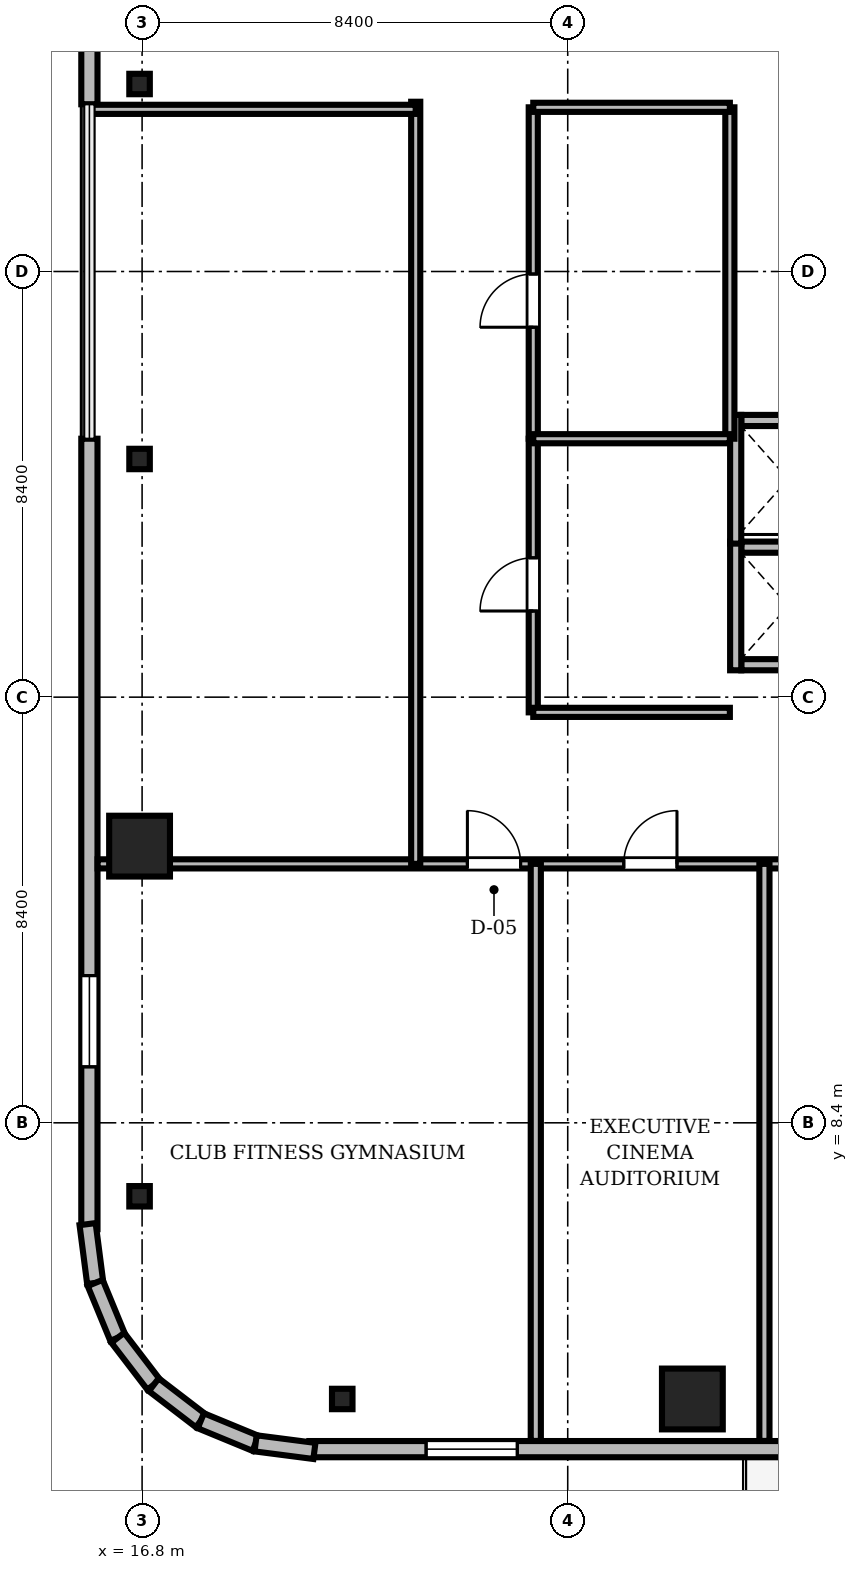
"""IFC4 building model, lengths in metres.
Left out: names, types, materials, properties, quantities, classifications, styles, units other than length and angle.
Written with IfcOpenShell. Run it as: python <this file> out.ifc"""

import sys

from ifc_helpers import new_model, si_unit, direction, frame, frame_2d, origin, origin_2d, place, context, subcontext, project, spatial, rectangle, i_section, extrude, source, transform, mapped, element, fill, save


model = new_model("IFC4")
c1 = context("Model", 3, precision=1e-05, world=origin(), true_north=direction((0.0, 1.0)))
c2 = subcontext(c1, "Body", "Model", "MODEL_VIEW")
j1 = project(units=[si_unit("LENGTHUNIT", "METRE"), si_unit("PLANEANGLEUNIT", "RADIAN")], contexts=[c1])
p1 = place(None, origin())
s1 = spatial("IfcSite", under=j1, at=p1, CompositionType="ELEMENT")
p2 = place(p1, origin())
s2 = spatial("IfcBuilding", under=s1, at=p2, CompositionType="ELEMENT")
p3 = place(p2, frame((0.0, 0.0, 250.6)))
s3 = spatial("IfcBuildingStorey", under=s2, at=p3, CompositionType="ELEMENT", Elevation=250.6)
m1 = source(origin(), c2, "Body", "SweptSolid", [
    extrude(rectangle(XDim=1.2, YDim=1.2, at=origin_2d()), origin(), (0.0, 0.0, 1.0), 3.65),
])
for number, where, z_axis, x_axis in (
    (1, (27.66, 2.95, 0.0), (0.0, 0.0, 1.0), (1.0, 0.0, 0.0)),
    (2, (16.75, 13.86, 0.0), (0.0, 0.0, 1.0), (1.0, 0.0, 0.0)),
):
    element("IfcColumn", number, at=place(p3, frame(where, z_axis=z_axis, x_axis=x_axis)), inside=s3, PredefinedType="COLUMN", context=c2, shape_type="MappedRepresentation", body=[
        mapped(m1, transform((0.0, 0.0, 0.0), scale=1.0)),
    ])
m2 = source(origin(), c2, "Body", "SweptSolid", [
    extrude(i_section(OverallWidth=0.405, OverallDepth=0.403, WebThickness=0.018, FlangeThickness=0.028, FilletRadius=0.015, at=origin_2d()), origin(), (0.0, 0.0, 1.0), 3.65),
])
for number, where, z_axis, x_axis in (
    (3, (20.75, 2.95, 0.0), (0.0, 0.0, 1.0), (1.0, 0.0, 0.0)),
    (4, (16.75, 28.9, 0.0), (0.0, 0.0, 1.0), (1.0, 0.0, 0.0)),
    (5, (16.75, 21.5, 0.0), (0.0, 0.0, 1.0), (1.0, 0.0, 0.0)),
    (6, (16.75, 6.95, 0.0), (0.0, 0.0, 1.0), (1.0, 0.0, 0.0)),
):
    element("IfcColumn", number, at=place(p3, frame(where, z_axis=z_axis, x_axis=x_axis)), inside=s3, PredefinedType="COLUMN", context=c2, shape_type="MappedRepresentation", body=[
        mapped(m2, transform((0.0, 0.0, 0.0), scale=1.0)),
    ])
m3 = source(origin(), c2, "Body", "SweptSolid", [
    extrude(rectangle(XDim=15.6, YDim=0.32, at=frame_2d((7.8, 0.0))), origin(), (0.0, 0.0, 1.0), 3.65),
])
p4 = place(p3, frame((20.1, 1.96, 0.0), z_axis=(0.0, 0.0, 1.0), x_axis=(1.0, 0.0, 0.0)))
e7 = element("IfcWall", 7, at=p4, inside=s3, PredefinedType="SOLIDWALL", context=c2, shape_type="MappedRepresentation", body=[
    mapped(m3, transform((0.0, 0.0, 0.0), scale=1.0)),
])
m4 = source(origin(), c2, "Body", "SweptSolid", [
    extrude(rectangle(XDim=1.4, YDim=2.3, at=frame_2d((0.7, 1.15))), frame((0.0, 0.17, 0.0), z_axis=(0.0, -1.0, 0.0), x_axis=(1.0, 0.0, 0.0)), (0.0, 0.0, 1.0), 0.34),
])
p5 = place(p4, frame((9.61, 0.0, 0.0)))
e8 = element("IfcOpeningElement", 8, at=p5, cuts=e7, PredefinedType="OPENING", context=c2, shape_type="MappedRepresentation", body=[
    mapped(m4, transform((0.0, 0.0, 0.0), scale=1.0)),
])
m5 = source(origin(), c2, "Body", "SweptSolid", [
    extrude(rectangle(XDim=1.8, YDim=2.4, at=frame_2d((0.9, 1.2))), frame((0.0, 0.17, 0.0), z_axis=(0.0, -1.0, 0.0), x_axis=(1.0, 0.0, 0.0)), (0.0, 0.0, 1.0), 0.34),
])
p6 = place(p4, frame((2.305, 0.0, 0.72)))
e9 = element("IfcOpeningElement", 9, at=p6, cuts=e7, PredefinedType="OPENING", context=c2, shape_type="MappedRepresentation", body=[
    mapped(m5, transform((0.0, 0.0, 0.0), scale=1.0)),
])
m6 = source(origin(), c2, "Body", "SweptSolid", [
    extrude(rectangle(XDim=15.6, YDim=0.32, at=frame_2d((7.8, 0.0))), origin(), (0.0, 0.0, 1.0), 3.65),
])
p7 = place(p3, frame((15.76, 44.1, 0.0), z_axis=(0.0, 0.0, 1.0), x_axis=(0.0, -1.0, 0.0)))
e10 = element("IfcWall", 10, at=p7, inside=s3, PredefinedType="SOLIDWALL", context=c2, shape_type="MappedRepresentation", body=[
    mapped(m6, transform((0.0, 0.0, 0.0), scale=1.0)),
])
p8 = place(p7, frame((9.61, 0.0, 0.0)))
e11 = element("IfcOpeningElement", 11, at=p8, cuts=e10, PredefinedType="OPENING", context=c2, shape_type="MappedRepresentation", body=[
    mapped(m4, transform((0.0, 0.0, 0.0), scale=1.0)),
])
p9 = place(p7, frame((3.205, 0.0, 0.72)))
e12 = element("IfcOpeningElement", 12, at=p9, cuts=e10, PredefinedType="OPENING", context=c2, shape_type="MappedRepresentation", body=[
    mapped(m5, transform((0.0, 0.0, 0.0), scale=1.0)),
])
p10 = place(p3, frame((15.76, 21.9, 0.0), z_axis=(0.0, 0.0, 1.0), x_axis=(0.0, -1.0, 0.0)))
e13 = element("IfcWall", 13, at=p10, inside=s3, PredefinedType="SOLIDWALL", context=c2, shape_type="MappedRepresentation", body=[
    mapped(m3, transform((0.0, 0.0, 0.0), scale=1.0)),
])
p11 = place(p10, frame((10.595, 0.0, 0.72)))
e14 = element("IfcOpeningElement", 14, at=p11, cuts=e13, PredefinedType="OPENING", context=c2, shape_type="MappedRepresentation", body=[
    mapped(m5, transform((0.0, 0.0, 0.0), scale=1.0)),
])
m7 = source(origin(), c2, "Body", "SweptSolid", [
    extrude(rectangle(XDim=1.171, YDim=0.32, at=frame_2d((0.585, 0.0))), origin(), (0.0, 0.0, 1.0), 3.65),
])
p12 = place(p3, frame((15.724, 6.401, 0.0), z_axis=(0.0, 0.0, 1.0), x_axis=(0.128269133229, -0.991739395941, 0.0)))
e15 = element("IfcWall", 15, at=p12, inside=s3, PredefinedType="SOLIDWALL", context=c2, shape_type="MappedRepresentation", body=[
    mapped(m7, transform((0.0, 0.0, 0.0), scale=1.0)),
])
m8 = source(origin(), c2, "Body", "SweptSolid", [
    extrude(rectangle(XDim=1.169, YDim=0.32, at=frame_2d((0.584, 0.0))), origin(), (0.0, 0.0, 1.0), 3.65),
])
for number, where, z_axis, x_axis in (
    (16, (15.875, 5.24, 0.0), (0.0, 0.0, 1.0), (0.381, -0.925, 0.0)),
    (17, (16.32, 4.159, 0.0), (0.0, 0.0, 1.0), (0.608, -0.794, 0.0)),
):
    element("IfcWall", number, at=place(p3, frame(where, z_axis=z_axis, x_axis=x_axis)), inside=s3, PredefinedType="SOLIDWALL", context=c2, shape_type="MappedRepresentation", body=[
        mapped(m8, transform((0.0, 0.0, 0.0), scale=1.0)),
    ])
m9 = source(origin(), c2, "Body", "SweptSolid", [
    extrude(rectangle(XDim=1.169, YDim=0.32, at=frame_2d((0.584, 0.0))), origin(), (0.0, 0.0, 1.0), 3.65),
])
p13 = place(p3, frame((17.031, 3.231, 0.0), z_axis=(0.0, 0.0, 1.0), x_axis=(0.793663520347, -0.608356981114, 0.0)))
e18 = element("IfcWall", 18, at=p13, inside=s3, PredefinedType="SOLIDWALL", context=c2, shape_type="MappedRepresentation", body=[
    mapped(m9, transform((0.0, 0.0, 0.0), scale=1.0)),
])
m10 = source(origin(), c2, "Body", "SweptSolid", [
    extrude(rectangle(XDim=1.169, YDim=0.32, at=frame_2d((0.585, 0.0))), origin(), (0.0, 0.0, 1.0), 3.65),
])
p14 = place(p3, frame((17.959, 2.52, 0.0), z_axis=(0.0, 0.0, 1.0), x_axis=(0.924479075121, -0.381232789334, 0.0)))
e19 = element("IfcWall", 19, at=p14, inside=s3, PredefinedType="SOLIDWALL", context=c2, shape_type="MappedRepresentation", body=[
    mapped(m10, transform((0.0, 0.0, 0.0), scale=1.0)),
])
m11 = source(origin(), c2, "Body", "SweptSolid", [
    extrude(rectangle(XDim=1.17, YDim=0.32, at=frame_2d((0.585, 0.0))), origin(), (0.0, 0.0, 1.0), 3.65),
])
p15 = place(p3, frame((19.04, 2.074, 0.0), z_axis=(0.0, 0.0, 1.0), x_axis=(0.991762485493, -0.128090485085, 0.0)))
e20 = element("IfcWall", 20, at=p15, inside=s3, PredefinedType="SOLIDWALL", context=c2, shape_type="MappedRepresentation", body=[
    mapped(m11, transform((0.0, 0.0, 0.0), scale=1.0)),
])
m12 = source(origin(), c2, "Body", "SweptSolid", [
    extrude(rectangle(XDim=1.85, YDim=0.22, at=frame_2d((0.925, 0.0))), origin(), (0.0, 0.0, 1.0), 3.65),
])
for number, where, z_axis, x_axis in (
    (21, (28.625, 17.44, 0.0), (0.0, 0.0, 1.0), (1.0, 0.0, 0.0)),
    (22, (28.625, 19.76, 0.0), (0.0, 0.0, 1.0), (1.0, 0.0, 0.0)),
):
    element("IfcWall", number, at=place(p3, frame(where, z_axis=z_axis, x_axis=x_axis)), inside=s3, PredefinedType="SOLIDWALL", context=c2, shape_type="MappedRepresentation", body=[
        mapped(m12, transform((0.0, 0.0, 0.0), scale=1.0)),
    ])
m13 = source(origin(), c2, "Body", "SweptSolid", [
    extrude(rectangle(XDim=2.54, YDim=0.22, at=frame_2d((1.27, 0.0))), origin(), (0.0, 0.0, 1.0), 3.65),
])
p16 = place(p3, frame((28.515, 17.33, 0.0), z_axis=(0.0, 0.0, 1.0), x_axis=(0.0, 1.0, 0.0)))
e23 = element("IfcWall", 23, at=p16, inside=s3, PredefinedType="SOLIDWALL", context=c2, shape_type="MappedRepresentation", body=[
    mapped(m13, transform((0.0, 0.0, 0.0), scale=1.0)),
])
p17 = place(p3, frame((28.625, 22.26, 0.0), z_axis=(0.0, 0.0, 1.0), x_axis=(1.0, 0.0, 0.0)))
e24 = element("IfcWall", 24, at=p17, inside=s3, PredefinedType="SOLIDWALL", context=c2, shape_type="MappedRepresentation", body=[
    mapped(m12, transform((0.0, 0.0, 0.0), scale=1.0)),
])
p18 = place(p3, frame((28.515, 19.83, 0.0), z_axis=(0.0, 0.0, 1.0), x_axis=(0.0, 1.0, 0.0)))
e25 = element("IfcWall", 25, at=p18, inside=s3, PredefinedType="SOLIDWALL", context=c2, shape_type="MappedRepresentation", body=[
    mapped(m13, transform((0.0, 0.0, 0.0), scale=1.0)),
])
m14 = source(origin(), c2, "Body", "SweptSolid", [
    extrude(rectangle(XDim=46.156, YDim=0.18, at=frame_2d((23.078, 0.0))), origin(), (0.0, 0.0, 1.0), 2.892),
])
p19 = place(p3, frame((15.922, 13.51, 0.0), z_axis=(0.0, 0.0, 1.0), x_axis=(1.0, 0.0, 0.0)))
e26 = element("IfcWall", 26, at=p19, inside=s3, PredefinedType="PARTITIONING", context=c2, shape_type="MappedRepresentation", body=[
    mapped(m14, transform((0.0, 0.0, 0.0), scale=1.0)),
])
m15 = source(origin(), c2, "Body", "SweptSolid", [
    extrude(rectangle(XDim=1.05, YDim=2.2, at=frame_2d((0.525, 1.1))), frame((0.0, 0.1, 0.0), z_axis=(0.0, -1.0, 0.0), x_axis=(1.0, 0.0, 0.0)), (0.0, 0.0, 1.0), 0.2),
])
p20 = place(p19, frame((7.298, 0.0, 0.0)))
e27 = element("IfcOpeningElement", 27, at=p20, cuts=e26, PredefinedType="OPENING", context=c2, shape_type="MappedRepresentation", body=[
    mapped(m15, transform((0.0, 0.0, 0.0), scale=1.0)),
])
p21 = place(p19, frame((10.384, 0.0, 0.0)))
e28 = element("IfcOpeningElement", 28, at=p21, cuts=e26, PredefinedType="OPENING", context=c2, shape_type="MappedRepresentation", body=[
    mapped(m15, transform((0.0, 0.0, 0.0), scale=1.0)),
])
p22 = place(p19, frame((15.647, 0.0, 0.0)))
e29 = element("IfcOpeningElement", 29, at=p22, cuts=e26, PredefinedType="OPENING", context=c2, shape_type="MappedRepresentation", body=[
    mapped(m15, transform((0.0, 0.0, 0.0), scale=1.0)),
])
p23 = place(p19, frame((21.659, 0.0, 0.0)))
e30 = element("IfcOpeningElement", 30, at=p23, cuts=e26, PredefinedType="OPENING", context=c2, shape_type="MappedRepresentation", body=[
    mapped(m15, transform((0.0, 0.0, 0.0), scale=1.0)),
])
p24 = place(p19, frame((28.422, 0.0, 0.0)))
e31 = element("IfcOpeningElement", 31, at=p24, cuts=e26, PredefinedType="OPENING", context=c2, shape_type="MappedRepresentation", body=[
    mapped(m15, transform((0.0, 0.0, 0.0), scale=1.0)),
])
p25 = place(p19, frame((33.798, 0.0, 0.0)))
e32 = element("IfcOpeningElement", 32, at=p25, cuts=e26, PredefinedType="OPENING", context=c2, shape_type="MappedRepresentation", body=[
    mapped(m15, transform((0.0, 0.0, 0.0), scale=1.0)),
])
m16 = source(origin(), c2, "Body", "SweptSolid", [
    extrude(rectangle(XDim=6.54, YDim=0.18, at=frame_2d((3.27, 0.0))), origin(), (0.0, 0.0, 1.0), 3.092),
])
p26 = place(p3, frame((24.52, 21.9, 0.0), z_axis=(0.0, 0.0, 1.0), x_axis=(0.0, 1.0, 0.0)))
e33 = element("IfcWall", 33, at=p26, inside=s3, PredefinedType="PARTITIONING", context=c2, shape_type="MappedRepresentation", body=[
    mapped(m16, transform((0.0, 0.0, 0.0), scale=1.0)),
])
p27 = place(p26, frame((2.2, 0.0, 0.0)))
e34 = element("IfcOpeningElement", 34, at=p27, cuts=e33, PredefinedType="OPENING", context=c2, shape_type="MappedRepresentation", body=[
    mapped(m15, transform((0.0, 0.0, 0.0), scale=1.0)),
])
m17 = source(origin(), c2, "Body", "SweptSolid", [
    extrude(rectangle(XDim=5.4, YDim=0.18, at=frame_2d((2.7, 0.0))), origin(), (0.0, 0.0, 1.0), 3.65),
])
p28 = place(p3, frame((24.52, 16.5, 0.0), z_axis=(0.0, 0.0, 1.0), x_axis=(0.0, 1.0, 0.0)))
e35 = element("IfcWall", 35, at=p28, inside=s3, PredefinedType="PARTITIONING", context=c2, shape_type="MappedRepresentation", body=[
    mapped(m17, transform((0.0, 0.0, 0.0), scale=1.0)),
])
p29 = place(p28, frame((2.0, 0.0, 0.0)))
e36 = element("IfcOpeningElement", 36, at=p29, cuts=e35, PredefinedType="OPENING", context=c2, shape_type="MappedRepresentation", body=[
    mapped(m15, transform((0.0, 0.0, 0.0), scale=1.0)),
])
m18 = source(origin(), c2, "Body", "SweptSolid", [
    extrude(rectangle(XDim=15.04, YDim=0.18, at=frame_2d((7.52, 0.0))), origin(), (0.0, 0.0, 1.0), 3.092),
])
p30 = place(p3, frame((22.2, 13.51, 0.0), z_axis=(0.0, 0.0, 1.0), x_axis=(0.0, 1.0, 0.0)))
e37 = element("IfcWall", 37, at=p30, inside=s3, PredefinedType="PARTITIONING", context=c2, shape_type="MappedRepresentation", body=[
    mapped(m18, transform((0.0, 0.0, 0.0), scale=1.0)),
])
m19 = source(origin(), c2, "Body", "SweptSolid", [
    extrude(rectangle(XDim=11.388, YDim=0.2, at=frame_2d((5.694, 0.0))), origin(), (0.0, 0.0, 1.0), 2.892),
])
for number, where, z_axis, x_axis in (
    (38, (24.57, 2.122, 0.0), (0.0, 0.0, 1.0), (0.0, 1.0, 0.0)),
    (39, (29.082, 2.122, 0.0), (0.0, 0.0, 1.0), (0.0, 1.0, 0.0)),
):
    element("IfcWall", number, at=place(p3, frame(where, z_axis=z_axis, x_axis=x_axis)), inside=s3, PredefinedType="PARTITIONING", context=c2, shape_type="MappedRepresentation", body=[
        mapped(m19, transform((0.0, 0.0, 0.0), scale=1.0)),
    ])
p31 = place(p3, frame((28.4, 21.9, 0.0), z_axis=(0.0, 0.0, 1.0), x_axis=(0.0, 1.0, 0.0)))
e40 = element("IfcWall", 40, at=p31, inside=s3, PredefinedType="PARTITIONING", context=c2, shape_type="MappedRepresentation", body=[
    mapped(m16, transform((0.0, 0.0, 0.0), scale=1.0)),
])
m20 = source(origin(), c2, "Body", "SweptSolid", [
    extrude(rectangle(XDim=6.47, YDim=0.18, at=frame_2d((3.235, 0.0))), origin(), (0.0, 0.0, 1.0), 2.892),
])
p32 = place(p3, frame((15.73, 28.4, 0.0), z_axis=(0.0, 0.0, 1.0), x_axis=(1.0, 0.0, 0.0)))
e41 = element("IfcWall", 41, at=p32, inside=s3, PredefinedType="PARTITIONING", context=c2, shape_type="MappedRepresentation", body=[
    mapped(m20, transform((0.0, 0.0, 0.0), scale=1.0)),
])
m21 = source(origin(), c2, "Body", "SweptSolid", [
    extrude(rectangle(XDim=3.88, YDim=0.18, at=frame_2d((1.94, 0.0))), origin(), (0.0, 0.0, 1.0), 3.65),
])
for number, where, z_axis, x_axis in (
    (42, (24.52, 16.5, 0.0), (0.0, 0.0, 1.0), (1.0, 0.0, 0.0)),
    (43, (24.52, 21.9, 0.0), (0.0, 0.0, 1.0), (1.0, 0.0, 0.0)),
    (44, (24.52, 28.44, 0.0), (0.0, 0.0, 1.0), (1.0, 0.0, 0.0)),
):
    element("IfcWall", number, at=place(p3, frame(where, z_axis=z_axis, x_axis=x_axis)), inside=s3, PredefinedType="PARTITIONING", context=c2, shape_type="MappedRepresentation", body=[
        mapped(m21, transform((0.0, 0.0, 0.0), scale=1.0)),
    ])
m22 = source(origin(), c2, "Body", "SweptSolid", [
    extrude(rectangle(XDim=1.8, YDim=2.4, at=frame_2d((0.9, 1.2))), frame((0.0, 0.03, 0.0), z_axis=(0.0, -1.0, 0.0), x_axis=(1.0, 0.0, 0.0)), (0.0, 0.0, 1.0), 0.06),
])
p33 = place(p6, origin())
e45 = element("IfcWindow", 45, at=p33, inside=s3, PartitioningType="SINGLE_PANEL", PredefinedType="WINDOW", context=c2, shape_type="MappedRepresentation", body=[
    mapped(m22, transform((0.0, 0.0, 0.0), scale=1.0)),
])
fill(e9, e45)
p34 = place(p11, origin())
e46 = element("IfcWindow", 46, at=p34, inside=s3, PartitioningType="SINGLE_PANEL", PredefinedType="WINDOW", context=c2, shape_type="MappedRepresentation", body=[
    mapped(m22, transform((0.0, 0.0, 0.0), scale=1.0)),
])
fill(e14, e46)
m23 = source(origin(), c2, "Body", "SweptSolid", [
    extrude(rectangle(XDim=1.05, YDim=2.2, at=frame_2d((0.525, 1.1))), frame((0.0, 0.025, 0.0), z_axis=(0.0, -1.0, 0.0), x_axis=(1.0, 0.0, 0.0)), (0.0, 0.0, 1.0), 0.05),
])
p35 = place(p20, origin())
e47 = element("IfcDoor", 47, at=p35, inside=s3, OperationType="SINGLE_SWING_LEFT", PredefinedType="DOOR", context=c2, shape_type="MappedRepresentation", body=[
    mapped(m23, transform((0.0, 0.0, 0.0), scale=1.0)),
])
fill(e27, e47)
p36 = place(p21, origin())
e48 = element("IfcDoor", 48, at=p36, inside=s3, OperationType="SINGLE_SWING_RIGHT", PredefinedType="DOOR", context=c2, shape_type="MappedRepresentation", body=[
    mapped(m23, transform((0.0, 0.0, 0.0), scale=1.0)),
])
fill(e28, e48)
p37 = place(p27, origin())
e49 = element("IfcDoor", 49, at=p37, inside=s3, OperationType="SINGLE_SWING_LEFT", PredefinedType="DOOR", context=c2, shape_type="MappedRepresentation", body=[
    mapped(m23, transform((0.0, 0.0, 0.0), scale=1.0)),
])
fill(e34, e49)
p38 = place(p29, origin())
e50 = element("IfcDoor", 50, at=p38, inside=s3, OperationType="SINGLE_SWING_LEFT", PredefinedType="DOOR", context=c2, shape_type="MappedRepresentation", body=[
    mapped(m23, transform((0.0, 0.0, 0.0), scale=1.0)),
])
fill(e36, e50)
save(model, sys.argv[1])
